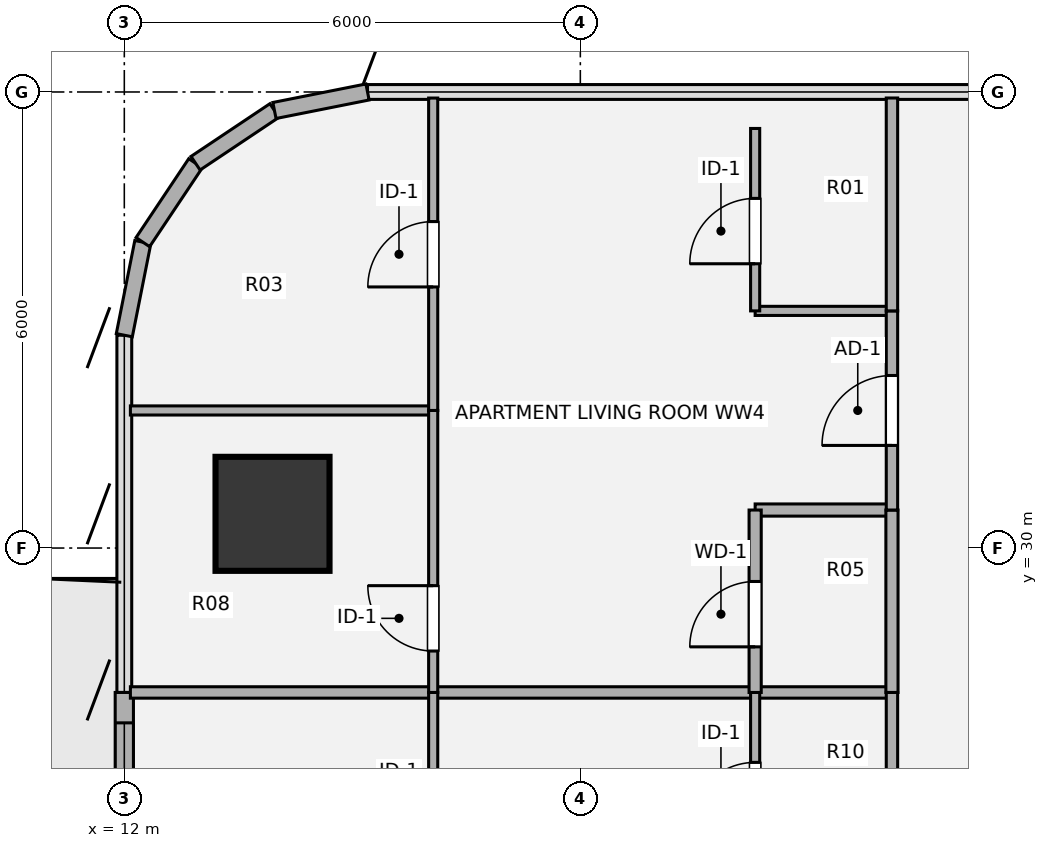
"""IFC4 building model, lengths in metres.
Left out: names, types, materials, properties, quantities, classifications, styles, units other than length and angle.
Written with IfcOpenShell. Run it as: python <this file> out.ifc"""

import sys

from ifc_helpers import new_model, si_unit, direction, frame, frame_2d, origin, origin_2d, place, context, subcontext, project, spatial, rectangle, hollow_circle, extrude, source, transform, mapped, element, fill, save


model = new_model("IFC4")
c1 = context("Model", 3, precision=1e-05, world=origin(), true_north=direction((0.0, 1.0)))
c2 = subcontext(c1, "Body", "Model", "MODEL_VIEW")
j1 = project(units=[si_unit("LENGTHUNIT", "METRE"), si_unit("PLANEANGLEUNIT", "RADIAN")], contexts=[c1])
p1 = place(None, origin())
s1 = spatial("IfcSite", under=j1, at=p1, CompositionType="ELEMENT")
p2 = place(p1, origin())
s2 = spatial("IfcBuilding", under=s1, at=p2, CompositionType="ELEMENT")
p3 = place(p2, frame((0.0, 0.0, 30.78)))
s3 = spatial("IfcBuildingStorey", under=s2, at=p3, CompositionType="ELEMENT", Elevation=30.78)
m1 = source(origin(), c2, "Body", "SweptSolid", [
    extrude(hollow_circle(Radius=0.75, WallThickness=0.05, at=origin_2d()), origin(), (0.0, 0.0, 1.0), 3.78),
])
p4 = place(p3, frame((13.95, 30.45, 0.0), z_axis=(0.0, 0.0, 1.0), x_axis=(1.0, 0.0, 0.0)))
e1 = element("IfcColumn", 1, at=p4, inside=s3, PredefinedType="COLUMN", context=c2, shape_type="MappedRepresentation", body=[
    mapped(m1, transform((0.0, 0.0, 0.0), x_axis=(1.0, 0.0, 0.0), y_axis=(0.0, 1.0, 0.0), z_axis=(0.0, 0.0, 1.0), scale=1.0)),
])
p5 = place(p3, frame((12.0, 24.5, 0.0), z_axis=(0.0, 0.0, 1.0), x_axis=(0.0, 1.0, 0.0)))
e2 = element("IfcWall", 2, at=p5, inside=s3, PredefinedType="SOLIDWALL", context=c2, shape_type="SweptSolid", body=[
    extrude(rectangle(XDim=3.6, YDim=0.24, at=frame_2d((1.8, 0.0))), origin(), (0.0, 0.0, 1.0), 3.53),
])
p6 = place(p5, frame((0.4, 0.0, 0.0)))
e3 = element("IfcOpeningElement", 3, at=p6, cuts=e2, PredefinedType="OPENING", context=c2, shape_type="SweptSolid", body=[
    extrude(rectangle(XDim=1.05, YDim=2.15, at=origin_2d()), frame((0.525, 0.13, 1.075), z_axis=(0.0, -1.0, 0.0), x_axis=(1.0, 0.0, 0.0)), (0.0, 0.0, 1.0), 0.26),
])
p7 = place(p5, frame((1.85, 0.0, 0.85)))
e4 = element("IfcOpeningElement", 4, at=p7, cuts=e2, PredefinedType="OPENING", context=c2, shape_type="SweptSolid", body=[
    extrude(rectangle(XDim=1.35, YDim=1.35, at=origin_2d()), frame((0.675, 0.13, 0.675), z_axis=(0.0, -1.0, 0.0), x_axis=(1.0, 0.0, 0.0)), (0.0, 0.0, 1.0), 0.26),
])
for number, where, z_axis, x_axis in (
    (5, (12.0, 32.8, 0.0), (0.0, 0.0, 1.0), (0.195, 0.981, 0.0)),
    (6, (12.244, 34.025, 0.0), (0.0, 0.0, 1.0), (0.556, 0.831, 0.0)),
    (7, (12.937, 35.063, 0.0), (0.0, 0.0, 1.0), (0.831, 0.556, 0.0)),
    (8, (13.975, 35.756, 0.0), (0.0, 0.0, 1.0), (0.981, 0.195, 0.0)),
):
    element("IfcWall", number, at=place(p3, frame(where, z_axis=z_axis, x_axis=x_axis)), inside=s3, PredefinedType="SOLIDWALL", context=c2, shape_type="SweptSolid", body=[
        extrude(rectangle(XDim=1.249, YDim=0.215, at=frame_2d((0.624, 0.0))), origin(), (0.0, 0.0, 1.0), 3.53),
    ])
p8 = place(p3, frame((12.08, 28.1, 0.0), z_axis=(0.0, 0.0, 1.0), x_axis=(1.0, 0.0, 0.0)))
e9 = element("IfcWall", 9, at=p8, inside=s3, PredefinedType="PARTITIONING", context=c2, shape_type="SweptSolid", body=[
    extrude(rectangle(XDim=10.02, YDim=0.15, at=frame_2d((5.01, 0.0))), origin(), (0.0, 0.0, 1.0), 2.982),
])
p9 = place(p3, frame((20.3, 30.5, 0.0), z_axis=(0.0, 0.0, 1.0), x_axis=(1.0, 0.0, 0.0)))
e10 = element("IfcWall", 10, at=p9, inside=s3, PredefinedType="PLUMBINGWALL", context=c2, shape_type="SweptSolid", body=[
    extrude(rectangle(XDim=1.8, YDim=0.16, at=frame_2d((0.9, 0.0))), origin(), (0.0, 0.0, 1.0), 2.903),
])
p10 = place(p3, frame((12.08, 31.81, 0.0), z_axis=(0.0, 0.0, 1.0), x_axis=(1.0, 0.0, 0.0)))
e11 = element("IfcWall", 11, at=p10, inside=s3, PredefinedType="PARTITIONING", context=c2, shape_type="SweptSolid", body=[
    extrude(rectangle(XDim=3.984, YDim=0.12, at=frame_2d((1.992, 0.0))), origin(), (0.0, 0.0, 1.0), 3.5),
])
p11 = place(p3, frame((20.3, 33.12, 0.0), z_axis=(0.0, 0.0, 1.0), x_axis=(1.0, 0.0, 0.0)))
e12 = element("IfcWall", 12, at=p11, inside=s3, PredefinedType="PARTITIONING", context=c2, shape_type="SweptSolid", body=[
    extrude(rectangle(XDim=1.8, YDim=0.12, at=frame_2d((0.9, 0.0))), origin(), (0.0, 0.0, 1.0), 3.055),
])
p12 = place(p3, frame((16.064, 24.4, 0.0), z_axis=(0.0, 0.0, 1.0), x_axis=(0.0, 1.0, 0.0)))
e13 = element("IfcWall", 13, at=p12, inside=s3, PredefinedType="PARTITIONING", context=c2, shape_type="SweptSolid", body=[
    extrude(rectangle(XDim=3.7, YDim=0.12, at=frame_2d((1.85, 0.0))), origin(), (0.0, 0.0, 1.0), 3.5),
])
p13 = place(p12, frame((1.42, 0.0, 0.0)))
e14 = element("IfcOpeningElement", 14, at=p13, cuts=e13, PredefinedType="OPENING", context=c2, shape_type="SweptSolid", body=[
    extrude(rectangle(XDim=0.86, YDim=2.1, at=origin_2d()), frame((0.43, 0.07, 1.05), z_axis=(0.0, -1.0, 0.0), x_axis=(1.0, 0.0, 0.0)), (0.0, 0.0, 1.0), 0.14),
])
p14 = place(p3, frame((16.064, 28.1, 0.0), z_axis=(0.0, 0.0, 1.0), x_axis=(0.0, 1.0, 0.0)))
e15 = element("IfcWall", 15, at=p14, inside=s3, PredefinedType="PARTITIONING", context=c2, shape_type="SweptSolid", body=[
    extrude(rectangle(XDim=3.71, YDim=0.12, at=frame_2d((1.855, 0.0))), origin(), (0.0, 0.0, 1.0), 3.5),
])
p15 = place(p14, frame((0.545, 0.0, 0.0)))
e16 = element("IfcOpeningElement", 16, at=p15, cuts=e15, PredefinedType="OPENING", context=c2, shape_type="SweptSolid", body=[
    extrude(rectangle(XDim=0.86, YDim=2.1, at=origin_2d()), frame((0.43, 0.07, 1.05), z_axis=(0.0, -1.0, 0.0), x_axis=(1.0, 0.0, 0.0)), (0.0, 0.0, 1.0), 0.14),
])
p16 = place(p3, frame((16.064, 31.81, 0.0), z_axis=(0.0, 0.0, 1.0), x_axis=(0.0, 1.0, 0.0)))
e17 = element("IfcWall", 17, at=p16, inside=s3, PredefinedType="PARTITIONING", context=c2, shape_type="SweptSolid", body=[
    extrude(rectangle(XDim=4.11, YDim=0.12, at=frame_2d((2.055, 0.0))), origin(), (0.0, 0.0, 1.0), 3.5),
])
p17 = place(p16, frame((1.625, 0.0, 0.0)))
e18 = element("IfcOpeningElement", 18, at=p17, cuts=e17, PredefinedType="OPENING", context=c2, shape_type="SweptSolid", body=[
    extrude(rectangle(XDim=0.86, YDim=2.1, at=origin_2d()), frame((0.43, 0.07, 1.05), z_axis=(0.0, -1.0, 0.0), x_axis=(1.0, 0.0, 0.0)), (0.0, 0.0, 1.0), 0.14),
])
p18 = place(p3, frame((20.3, 25.7, 0.0), z_axis=(0.0, 0.0, 1.0), x_axis=(0.0, 1.0, 0.0)))
e19 = element("IfcWall", 19, at=p18, inside=s3, PredefinedType="PARTITIONING", context=c2, shape_type="SweptSolid", body=[
    extrude(rectangle(XDim=2.4, YDim=0.12, at=frame_2d((1.2, 0.0))), origin(), (0.0, 0.0, 1.0), 3.5),
])
p19 = place(p18, frame((0.62, 0.0, 0.0)))
e20 = element("IfcOpeningElement", 20, at=p19, cuts=e19, PredefinedType="OPENING", context=c2, shape_type="SweptSolid", body=[
    extrude(rectangle(XDim=0.86, YDim=2.1, at=origin_2d()), frame((0.43, 0.07, 1.05), z_axis=(0.0, -1.0, 0.0), x_axis=(1.0, 0.0, 0.0)), (0.0, 0.0, 1.0), 0.14),
])
p20 = place(p3, frame((20.3, 28.1, 0.0), z_axis=(0.0, 0.0, 1.0), x_axis=(0.0, 1.0, 0.0)))
e21 = element("IfcWall", 21, at=p20, inside=s3, PredefinedType="PLUMBINGWALL", context=c2, shape_type="SweptSolid", body=[
    extrude(rectangle(XDim=2.4, YDim=0.16, at=frame_2d((1.2, 0.0))), origin(), (0.0, 0.0, 1.0), 3.5),
])
p21 = place(p20, frame((0.6, 0.0, 0.0)))
e22 = element("IfcOpeningElement", 22, at=p21, cuts=e21, PredefinedType="OPENING", context=c2, shape_type="SweptSolid", body=[
    extrude(rectangle(XDim=0.86, YDim=2.1, at=origin_2d()), frame((0.43, 0.09, 1.05), z_axis=(0.0, -1.0, 0.0), x_axis=(1.0, 0.0, 0.0)), (0.0, 0.0, 1.0), 0.18),
])
p22 = place(p3, frame((20.3, 33.12, 0.0), z_axis=(0.0, 0.0, 1.0), x_axis=(0.0, 1.0, 0.0)))
e23 = element("IfcWall", 23, at=p22, inside=s3, PredefinedType="PARTITIONING", context=c2, shape_type="SweptSolid", body=[
    extrude(rectangle(XDim=2.4, YDim=0.12, at=frame_2d((1.2, 0.0))), origin(), (0.0, 0.0, 1.0), 3.5),
])
p23 = place(p22, frame((0.62, 0.0, 0.0)))
e24 = element("IfcOpeningElement", 24, at=p23, cuts=e23, PredefinedType="OPENING", context=c2, shape_type="SweptSolid", body=[
    extrude(rectangle(XDim=0.86, YDim=2.1, at=origin_2d()), frame((0.43, 0.07, 1.05), z_axis=(0.0, -1.0, 0.0), x_axis=(1.0, 0.0, 0.0)), (0.0, 0.0, 1.0), 0.14),
])
p24 = place(p3, frame((22.1, 25.7, 0.0), z_axis=(0.0, 0.0, 1.0), x_axis=(0.0, 1.0, 0.0)))
e25 = element("IfcWall", 25, at=p24, inside=s3, PredefinedType="PARTITIONING", context=c2, shape_type="SweptSolid", body=[
    extrude(rectangle(XDim=2.4, YDim=0.15, at=frame_2d((1.2, 0.0))), origin(), (0.0, 0.0, 1.0), 3.5),
])
p25 = place(p3, frame((22.1, 28.1, 0.0), z_axis=(0.0, 0.0, 1.0), x_axis=(0.0, 1.0, 0.0)))
e26 = element("IfcWall", 26, at=p25, inside=s3, PredefinedType="PLUMBINGWALL", context=c2, shape_type="SweptSolid", body=[
    extrude(rectangle(XDim=2.4, YDim=0.16, at=frame_2d((1.2, 0.0))), origin(), (0.0, 0.0, 1.0), 3.5),
])
p26 = place(p3, frame((22.1, 30.5, 0.0), z_axis=(0.0, 0.0, 1.0), x_axis=(0.0, 1.0, 0.0)))
e27 = element("IfcWall", 27, at=p26, inside=s3, PredefinedType="PARTITIONING", context=c2, shape_type="SweptSolid", body=[
    extrude(rectangle(XDim=2.62, YDim=0.15, at=frame_2d((1.31, 0.0))), origin(), (0.0, 0.0, 1.0), 3.5),
])
p27 = place(p26, frame((0.85, 0.0, 0.0)))
e28 = element("IfcOpeningElement", 28, at=p27, cuts=e27, PredefinedType="OPENING", context=c2, shape_type="SweptSolid", body=[
    extrude(rectangle(XDim=0.92, YDim=2.1, at=origin_2d()), frame((0.46, 0.085, 1.05), z_axis=(0.0, -1.0, 0.0), x_axis=(1.0, 0.0, 0.0)), (0.0, 0.0, 1.0), 0.17),
])
p28 = place(p3, frame((22.1, 33.12, 0.0), z_axis=(0.0, 0.0, 1.0), x_axis=(0.0, 1.0, 0.0)))
e29 = element("IfcWall", 29, at=p28, inside=s3, PredefinedType="PARTITIONING", context=c2, shape_type="SweptSolid", body=[
    extrude(rectangle(XDim=2.801, YDim=0.15, at=frame_2d((1.4, 0.0))), origin(), (0.0, 0.0, 1.0), 3.5),
])
m2 = source(origin(), c2, "Body", "SweptSolid", [
    extrude(rectangle(XDim=1.35, YDim=1.35, at=origin_2d()), frame((0.675, 0.03, 0.675), z_axis=(0.0, -1.0, 0.0), x_axis=(1.0, 0.0, 0.0)), (0.0, 0.0, 1.0), 0.06),
])
p29 = place(p7, origin())
e30 = element("IfcWindow", 30, at=p29, inside=s3, PartitioningType="SINGLE_PANEL", PredefinedType="WINDOW", context=c2, shape_type="MappedRepresentation", body=[
    mapped(m2, transform((0.0, 0.0, 0.0), x_axis=(1.0, 0.0, 0.0), y_axis=(0.0, 1.0, 0.0), z_axis=(0.0, 0.0, 1.0), scale=1.0)),
])
fill(e4, e30)
m3 = source(origin(), c2, "Body", "SweptSolid", [
    extrude(rectangle(XDim=0.86, YDim=2.1, at=origin_2d()), frame((0.43, 0.025, 1.05), z_axis=(0.0, -1.0, 0.0), x_axis=(1.0, 0.0, 0.0)), (0.0, 0.0, 1.0), 0.05),
])
p30 = place(p15, origin())
e31 = element("IfcDoor", 31, at=p30, inside=s3, OperationType="SINGLE_SWING_RIGHT", PredefinedType="DOOR", context=c2, shape_type="MappedRepresentation", body=[
    mapped(m3, transform((0.0, 0.0, 0.0), x_axis=(1.0, 0.0, 0.0), y_axis=(0.0, 1.0, 0.0), z_axis=(0.0, 0.0, 1.0), scale=1.0)),
])
fill(e16, e31)
p31 = place(p17, origin())
e32 = element("IfcDoor", 32, at=p31, inside=s3, OperationType="SINGLE_SWING_LEFT", PredefinedType="DOOR", context=c2, shape_type="MappedRepresentation", body=[
    mapped(m3, transform((0.0, 0.0, 0.0), x_axis=(1.0, 0.0, 0.0), y_axis=(0.0, 1.0, 0.0), z_axis=(0.0, 0.0, 1.0), scale=1.0)),
])
fill(e18, e32)
p32 = place(p19, origin())
e33 = element("IfcDoor", 33, at=p32, inside=s3, OperationType="SINGLE_SWING_LEFT", PredefinedType="DOOR", context=c2, shape_type="MappedRepresentation", body=[
    mapped(m3, transform((0.0, 0.0, 0.0), x_axis=(1.0, 0.0, 0.0), y_axis=(0.0, 1.0, 0.0), z_axis=(0.0, 0.0, 1.0), scale=1.0)),
])
fill(e20, e33)
m4 = source(origin(), c2, "Body", "SweptSolid", [
    extrude(rectangle(XDim=0.86, YDim=2.1, at=origin_2d()), frame((0.43, 0.025, 1.05), z_axis=(0.0, -1.0, 0.0), x_axis=(1.0, 0.0, 0.0)), (0.0, 0.0, 1.0), 0.05),
])
p33 = place(p21, origin())
e34 = element("IfcDoor", 34, at=p33, inside=s3, OperationType="SINGLE_SWING_LEFT", PredefinedType="DOOR", context=c2, shape_type="MappedRepresentation", body=[
    mapped(m4, transform((0.0, 0.0, 0.0), x_axis=(1.0, 0.0, 0.0), y_axis=(0.0, 1.0, 0.0), z_axis=(0.0, 0.0, 1.0), scale=1.0)),
])
fill(e22, e34)
p34 = place(p23, origin())
e35 = element("IfcDoor", 35, at=p34, inside=s3, OperationType="SINGLE_SWING_LEFT", PredefinedType="DOOR", context=c2, shape_type="MappedRepresentation", body=[
    mapped(m3, transform((0.0, 0.0, 0.0), x_axis=(1.0, 0.0, 0.0), y_axis=(0.0, 1.0, 0.0), z_axis=(0.0, 0.0, 1.0), scale=1.0)),
])
fill(e24, e35)
m5 = source(origin(), c2, "Body", "SweptSolid", [
    extrude(rectangle(XDim=0.92, YDim=2.1, at=origin_2d()), frame((0.46, 0.025, 1.05), z_axis=(0.0, -1.0, 0.0), x_axis=(1.0, 0.0, 0.0)), (0.0, 0.0, 1.0), 0.05),
])
p35 = place(p27, origin())
e36 = element("IfcDoor", 36, at=p35, inside=s3, OperationType="SINGLE_SWING_LEFT", PredefinedType="DOOR", context=c2, shape_type="MappedRepresentation", body=[
    mapped(m5, transform((0.0, 0.0, 0.0), x_axis=(1.0, 0.0, 0.0), y_axis=(0.0, 1.0, 0.0), z_axis=(0.0, 0.0, 1.0), scale=1.0)),
])
fill(e28, e36)
save(model, sys.argv[1])
